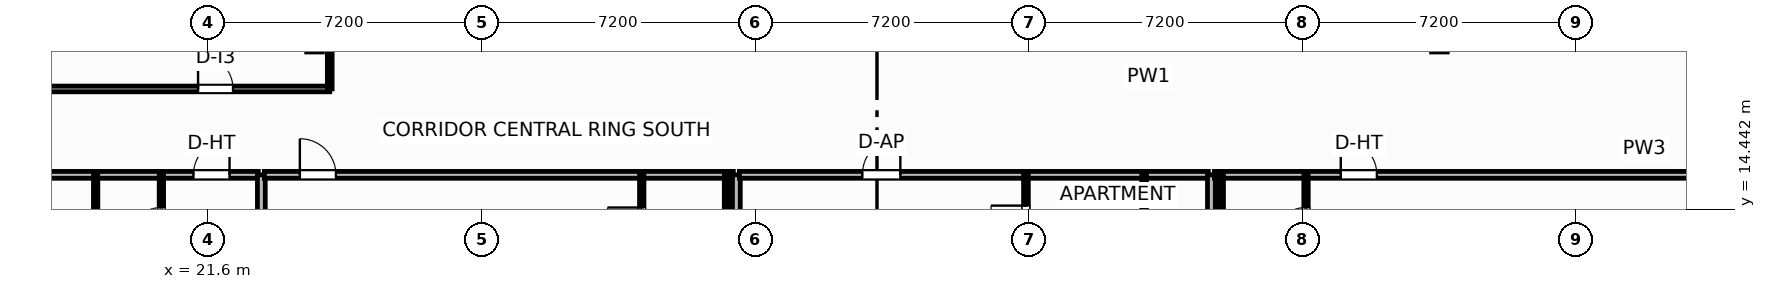
"""IFC4 building model, lengths in metres.
Left out: names, types, materials, properties, quantities, classifications, styles, units other than length and angle.
Written with IfcOpenShell. Run it as: python <this file> out.ifc"""

import sys

from ifc_helpers import new_model, si_unit, direction, frame, frame_2d, origin, place, context, subcontext, project, spatial, rectangle, extrude, element, fill, save


model = new_model("IFC4")
c1 = context("Model", 3, precision=1e-05, world=origin(), true_north=direction((0.0, 1.0)))
c2 = subcontext(c1, "Body", "Model", "MODEL_VIEW")
j1 = project(units=[si_unit("LENGTHUNIT", "METRE"), si_unit("PLANEANGLEUNIT", "RADIAN")], contexts=[c1])
p1 = place(None, origin())
s1 = spatial("IfcSite", under=j1, at=p1, CompositionType="ELEMENT")
p2 = place(p1, origin())
s2 = spatial("IfcBuilding", under=s1, at=p2, CompositionType="ELEMENT")
p3 = place(p2, frame((0.0, 0.0, 227.5)))
s3 = spatial("IfcBuildingStorey", under=s2, at=p3, CompositionType="ELEMENT", Elevation=227.5)
p4 = place(p3, frame((56.219, 9.845, 0.0), z_axis=(0.0, 0.0, 1.0), x_axis=(0.935225601791, 0.354052360188, 0.0)))
e1 = element("IfcWall", 1, at=p4, inside=s3, PredefinedType="SOLIDWALL", context=c2, shape_type="SweptSolid", body=[
    extrude(rectangle(XDim=17.647, YDim=0.22, at=frame_2d((8.824, 0.0))), origin(), (0.0, 0.0, 1.0), 2.73),
])
p5 = place(p4, frame((7.774, 0.0, 0.8)))
e2 = element("IfcOpeningElement", 2, at=p5, cuts=e1, PredefinedType="OPENING", context=c2, shape_type="SweptSolid", body=[
    extrude(rectangle(XDim=2.1, YDim=1.75, at=frame_2d((1.05, 0.875))), frame((0.0, 0.12, 0.0), z_axis=(0.0, -1.0, 0.0), x_axis=(1.0, 0.0, 0.0)), (0.0, 0.0, 1.0), 0.24),
])
p6 = place(p3, frame((6.908, 17.61, 0.0), z_axis=(0.0, 0.0, 1.0), x_axis=(1.0, 0.0, 0.0)))
e3 = element("IfcWall", 3, at=p6, inside=s3, PredefinedType="PARTITIONING", context=c2, shape_type="SweptSolid", body=[
    extrude(rectangle(XDim=17.892, YDim=0.15, at=frame_2d((8.946, 0.0))), origin(), (0.0, 0.0, 1.0), 3.45),
])
p7 = place(p6, frame((14.427, 0.0, 0.0)))
e4 = element("IfcOpeningElement", 4, at=p7, cuts=e3, PredefinedType="OPENING", context=c2, shape_type="SweptSolid", body=[
    extrude(rectangle(XDim=0.92, YDim=2.05, at=frame_2d((0.46, 1.025))), frame((0.0, 0.085, 0.0), z_axis=(0.0, -1.0, 0.0), x_axis=(1.0, 0.0, 0.0)), (0.0, 0.0, 1.0), 0.17),
])
p8 = place(p3, frame((24.8, 17.61, 0.0), z_axis=(0.0, 0.0, 1.0), x_axis=(0.0, 1.0, 0.0)))
e5 = element("IfcWall", 5, at=p8, inside=s3, PredefinedType="PARTITIONING", context=c2, shape_type="SweptSolid", body=[
    extrude(rectangle(XDim=1.63, YDim=0.125, at=frame_2d((0.815, 0.0))), origin(), (0.0, 0.0, 1.0), 2.739),
])
p9 = place(p3, frame((7.764, 15.35, 0.0), z_axis=(0.0, 0.0, 1.0), x_axis=(1.0, 0.0, 0.0)))
e6 = element("IfcWall", 6, at=p9, inside=s3, PredefinedType="PARTITIONING", context=c2, shape_type="SweptSolid", body=[
    extrude(rectangle(XDim=15.156, YDim=0.18, at=frame_2d((7.578, 0.0))), origin(), (0.0, 0.0, 1.0), 3.45),
])
p10 = place(p9, frame((13.45, 0.0, 0.0)))
e7 = element("IfcOpeningElement", 7, at=p10, cuts=e6, PredefinedType="OPENING", context=c2, shape_type="SweptSolid", body=[
    extrude(rectangle(XDim=0.95, YDim=2.15, at=frame_2d((0.475, 1.075))), frame((0.0, 0.1, 0.0), z_axis=(0.0, -1.0, 0.0), x_axis=(1.0, 0.0, 0.0)), (0.0, 0.0, 1.0), 0.2),
])
p11 = place(p3, frame((20.37, 12.83, 0.0), z_axis=(0.0, 0.0, 1.0), x_axis=(0.0, 1.0, 0.0)))
e8 = element("IfcWall", 8, at=p11, inside=s3, PredefinedType="PARTITIONING", context=c2, shape_type="SweptSolid", body=[
    extrude(rectangle(XDim=2.52, YDim=0.115, at=frame_2d((1.26, 0.0))), origin(), (0.0, 0.0, 1.0), 3.45),
])
p12 = place(p11, frame((0.76, 0.0, 0.0)))
e9 = element("IfcOpeningElement", 9, at=p12, cuts=e8, PredefinedType="OPENING", context=c2, shape_type="SweptSolid", body=[
    extrude(rectangle(XDim=0.9, YDim=2.05, at=frame_2d((0.45, 1.025))), frame((0.0, 0.067, 0.0), z_axis=(0.0, -1.0, 0.0), x_axis=(1.0, 0.0, 0.0)), (0.0, 0.0, 1.0), 0.135),
])
p13 = place(p3, frame((18.64, 12.83, 0.0), z_axis=(0.0, 0.0, 1.0), x_axis=(0.0, 1.0, 0.0)))
e10 = element("IfcWall", 10, at=p13, inside=s3, PredefinedType="PARTITIONING", context=c2, shape_type="SweptSolid", body=[
    extrude(rectangle(XDim=2.52, YDim=0.115, at=frame_2d((1.26, 0.0))), origin(), (0.0, 0.0, 1.0), 3.45),
])
p14 = place(p3, frame((23.0, -2.71, 0.0), z_axis=(0.0, 0.0, 1.0), x_axis=(0.0, 1.0, 0.0)))
e11 = element("IfcWall", 11, at=p14, inside=s3, PredefinedType="PARTITIONING", context=c2, shape_type="SweptSolid", body=[
    extrude(rectangle(XDim=18.06, YDim=0.205, at=frame_2d((9.03, 0.0))), origin(), (0.0, 0.0, 1.0), 3.45),
])
p15 = place(p3, frame((23.08, 15.35, 0.0), z_axis=(0.0, 0.0, 1.0), x_axis=(1.0, 0.0, 0.0)))
e12 = element("IfcWall", 12, at=p15, inside=s3, PredefinedType="PARTITIONING", context=c2, shape_type="SweptSolid", body=[
    extrude(rectangle(XDim=12.34, YDim=0.18, at=frame_2d((6.17, 0.0))), origin(), (0.0, 0.0, 1.0), 3.45),
])
p16 = place(p15, frame((0.933, 0.0, 0.0)))
e13 = element("IfcOpeningElement", 13, at=p16, cuts=e12, PredefinedType="OPENING", context=c2, shape_type="SweptSolid", body=[
    extrude(rectangle(XDim=0.95, YDim=2.15, at=frame_2d((0.475, 1.075))), frame((0.0, 0.1, 0.0), z_axis=(0.0, -1.0, 0.0), x_axis=(1.0, 0.0, 0.0)), (0.0, 0.0, 1.0), 0.2),
])
p17 = place(p3, frame((33.01, 12.83, 0.0), z_axis=(0.0, 0.0, 1.0), x_axis=(0.0, 1.0, 0.0)))
e14 = element("IfcWall", 14, at=p17, inside=s3, PredefinedType="PARTITIONING", context=c2, shape_type="SweptSolid", body=[
    extrude(rectangle(XDim=2.52, YDim=0.115, at=frame_2d((1.26, 0.0))), origin(), (0.0, 0.0, 1.0), 3.45),
])
p18 = place(p17, frame((0.76, 0.0, 0.0)))
e15 = element("IfcOpeningElement", 15, at=p18, cuts=e14, PredefinedType="OPENING", context=c2, shape_type="SweptSolid", body=[
    extrude(rectangle(XDim=0.9, YDim=2.05, at=frame_2d((0.45, 1.025))), frame((0.0, 0.067, 0.0), z_axis=(0.0, -1.0, 0.0), x_axis=(1.0, 0.0, 0.0)), (0.0, 0.0, 1.0), 0.135),
])
p19 = place(p3, frame((35.24, 12.83, 0.0), z_axis=(0.0, 0.0, 1.0), x_axis=(0.0, 1.0, 0.0)))
e16 = element("IfcWall", 16, at=p19, inside=s3, PredefinedType="PARTITIONING", context=c2, shape_type="SweptSolid", body=[
    extrude(rectangle(XDim=2.52, YDim=0.115, at=frame_2d((1.26, 0.0))), origin(), (0.0, 0.0, 1.0), 2.739),
])
p20 = place(p3, frame((35.5, 2.022, 0.0), z_axis=(0.0, 0.0, 1.0), x_axis=(0.0, 1.0, 0.0)))
e17 = element("IfcWall", 17, at=p20, inside=s3, PredefinedType="PARTITIONING", context=c2, shape_type="SweptSolid", body=[
    extrude(rectangle(XDim=13.328, YDim=0.205, at=frame_2d((6.664, 0.0))), origin(), (0.0, 0.0, 1.0), 2.739),
])
p21 = place(p3, frame((35.58, 15.35, 0.0), z_axis=(0.0, 0.0, 1.0), x_axis=(1.0, 0.0, 0.0)))
e18 = element("IfcWall", 18, at=p21, inside=s3, PredefinedType="PARTITIONING", context=c2, shape_type="SweptSolid", body=[
    extrude(rectangle(XDim=12.34, YDim=0.18, at=frame_2d((6.17, 0.0))), origin(), (0.0, 0.0, 1.0), 3.45),
])
p22 = place(p21, frame((3.235, 0.0, 0.0)))
e19 = element("IfcOpeningElement", 19, at=p22, cuts=e18, PredefinedType="OPENING", context=c2, shape_type="SweptSolid", body=[
    extrude(rectangle(XDim=1.0, YDim=2.2, at=frame_2d((0.5, 1.1))), frame((0.0, 0.1, 0.0), z_axis=(0.0, -1.0, 0.0), x_axis=(1.0, 0.0, 0.0)), (0.0, 0.0, 1.0), 0.2),
])
p23 = place(p3, frame((43.12, 4.907, 0.0), z_axis=(0.0, 0.0, 1.0), x_axis=(0.0, 1.0, 0.0)))
e20 = element("IfcWall", 20, at=p23, inside=s3, PredefinedType="PARTITIONING", context=c2, shape_type="SweptSolid", body=[
    extrude(rectangle(XDim=10.443, YDim=0.125, at=frame_2d((5.222, 0.0))), origin(), (0.0, 0.0, 1.0), 3.45),
])
p24 = place(p23, frame((2.32, 0.0, 0.0)))
e21 = element("IfcOpeningElement", 21, at=p24, cuts=e20, PredefinedType="OPENING", context=c2, shape_type="SweptSolid", body=[
    extrude(rectangle(XDim=0.92, YDim=2.05, at=frame_2d((0.46, 1.025))), frame((0.0, 0.073, 0.0), z_axis=(0.0, -1.0, 0.0), x_axis=(1.0, 0.0, 0.0)), (0.0, 0.0, 1.0), 0.145),
])
p25 = place(p23, frame((6.42, 0.0, 0.0)))
e22 = element("IfcOpeningElement", 22, at=p25, cuts=e20, PredefinedType="OPENING", context=c2, shape_type="SweptSolid", body=[
    extrude(rectangle(XDim=0.9, YDim=2.05, at=frame_2d((0.45, 1.025))), frame((0.0, 0.073, 0.0), z_axis=(0.0, -1.0, 0.0), x_axis=(1.0, 0.0, 0.0)), (0.0, 0.0, 1.0), 0.145),
])
p26 = place(p23, frame((8.713, 0.0, 0.0)))
e23 = element("IfcOpeningElement", 23, at=p26, cuts=e20, PredefinedType="OPENING", context=c2, shape_type="SweptSolid", body=[
    extrude(rectangle(XDim=0.92, YDim=2.05, at=frame_2d((0.46, 1.025))), frame((0.0, 0.073, 0.0), z_axis=(0.0, -1.0, 0.0), x_axis=(1.0, 0.0, 0.0)), (0.0, 0.0, 1.0), 0.145),
])
p27 = place(p3, frame((46.23, 12.94, 0.0), z_axis=(0.0, 0.0, 1.0), x_axis=(0.0, 1.0, 0.0)))
e24 = element("IfcWall", 24, at=p27, inside=s3, PredefinedType="PARTITIONING", context=c2, shape_type="SweptSolid", body=[
    extrude(rectangle(XDim=2.41, YDim=0.125, at=frame_2d((1.205, 0.0))), origin(), (0.0, 0.0, 1.0), 3.45),
])
p28 = place(p3, frame((48.0, 6.754, 0.0), z_axis=(0.0, 0.0, 1.0), x_axis=(0.0, 1.0, 0.0)))
e25 = element("IfcWall", 25, at=p28, inside=s3, PredefinedType="PARTITIONING", context=c2, shape_type="SweptSolid", body=[
    extrude(rectangle(XDim=8.596, YDim=0.205, at=frame_2d((4.298, 0.0))), origin(), (0.0, 0.0, 1.0), 3.45),
])
p29 = place(p3, frame((48.08, 15.35, 0.0), z_axis=(0.0, 0.0, 1.0), x_axis=(1.0, 0.0, 0.0)))
e26 = element("IfcWall", 26, at=p29, inside=s3, PredefinedType="PARTITIONING", context=c2, shape_type="SweptSolid", body=[
    extrude(rectangle(XDim=22.624, YDim=0.18, at=frame_2d((11.312, 0.0))), origin(), (0.0, 0.0, 1.0), 3.45),
])
p30 = place(p29, frame((3.324, 0.0, 0.0)))
e27 = element("IfcOpeningElement", 27, at=p30, cuts=e26, PredefinedType="OPENING", context=c2, shape_type="SweptSolid", body=[
    extrude(rectangle(XDim=0.95, YDim=2.15, at=frame_2d((0.475, 1.075))), frame((0.0, 0.1, 0.0), z_axis=(0.0, -1.0, 0.0), x_axis=(1.0, 0.0, 0.0)), (0.0, 0.0, 1.0), 0.2),
])
p31 = place(p3, frame((50.49, 12.83, 0.0), z_axis=(0.0, 0.0, 1.0), x_axis=(0.0, 1.0, 0.0)))
e28 = element("IfcWall", 28, at=p31, inside=s3, PredefinedType="PARTITIONING", context=c2, shape_type="SweptSolid", body=[
    extrude(rectangle(XDim=2.52, YDim=0.115, at=frame_2d((1.26, 0.0))), origin(), (0.0, 0.0, 1.0), 3.45),
])
p32 = place(p31, frame((0.76, 0.0, 0.0)))
e29 = element("IfcOpeningElement", 29, at=p32, cuts=e28, PredefinedType="OPENING", context=c2, shape_type="SweptSolid", body=[
    extrude(rectangle(XDim=0.9, YDim=2.05, at=frame_2d((0.45, 1.025))), frame((0.0, 0.067, 0.0), z_axis=(0.0, -1.0, 0.0), x_axis=(1.0, 0.0, 0.0)), (0.0, 0.0, 1.0), 0.135),
])
p33 = place(p3, frame((48.26, 12.83, 0.0), z_axis=(0.0, 0.0, 1.0), x_axis=(0.0, 1.0, 0.0)))
e30 = element("IfcWall", 30, at=p33, inside=s3, PredefinedType="PARTITIONING", context=c2, shape_type="SweptSolid", body=[
    extrude(rectangle(XDim=2.52, YDim=0.115, at=frame_2d((1.26, 0.0))), origin(), (0.0, 0.0, 1.0), 3.45),
])
p34 = place(p7, origin())
e31 = element("IfcDoor", 31, at=p34, inside=s3, OperationType="SINGLE_SWING_LEFT", PredefinedType="DOOR", context=c2, shape_type="SweptSolid", body=[
    extrude(rectangle(XDim=0.92, YDim=2.05, at=frame_2d((0.46, 1.025))), frame((0.0, 0.025, 0.0), z_axis=(0.0, -1.0, 0.0), x_axis=(1.0, 0.0, 0.0)), (0.0, 0.0, 1.0), 0.05),
])
fill(e4, e31)
p35 = place(p10, origin())
e32 = element("IfcDoor", 32, at=p35, inside=s3, OperationType="SINGLE_SWING_RIGHT", PredefinedType="DOOR", context=c2, shape_type="SweptSolid", body=[
    extrude(rectangle(XDim=0.95, YDim=2.15, at=frame_2d((0.475, 1.075))), frame((0.0, 0.025, 0.0), z_axis=(0.0, -1.0, 0.0), x_axis=(1.0, 0.0, 0.0)), (0.0, 0.0, 1.0), 0.05),
])
fill(e7, e32)
p36 = place(p12, origin())
e33 = element("IfcDoor", 33, at=p36, inside=s3, OperationType="SINGLE_SWING_LEFT", PredefinedType="DOOR", context=c2, shape_type="SweptSolid", body=[
    extrude(rectangle(XDim=0.9, YDim=2.05, at=frame_2d((0.45, 1.025))), frame((0.0, 0.025, 0.0), z_axis=(0.0, -1.0, 0.0), x_axis=(1.0, 0.0, 0.0)), (0.0, 0.0, 1.0), 0.05),
])
fill(e9, e33)
p37 = place(p16, origin())
e34 = element("IfcDoor", 34, at=p37, inside=s3, OperationType="SINGLE_SWING_LEFT", PredefinedType="DOOR", context=c2, shape_type="SweptSolid", body=[
    extrude(rectangle(XDim=0.95, YDim=2.15, at=frame_2d((0.475, 1.075))), frame((0.0, 0.025, 0.0), z_axis=(0.0, -1.0, 0.0), x_axis=(1.0, 0.0, 0.0)), (0.0, 0.0, 1.0), 0.05),
])
fill(e13, e34)
p38 = place(p18, origin())
e35 = element("IfcDoor", 35, at=p38, inside=s3, OperationType="SINGLE_SWING_RIGHT", PredefinedType="DOOR", context=c2, shape_type="SweptSolid", body=[
    extrude(rectangle(XDim=0.9, YDim=2.05, at=frame_2d((0.45, 1.025))), frame((0.0, 0.025, 0.0), z_axis=(0.0, -1.0, 0.0), x_axis=(1.0, 0.0, 0.0)), (0.0, 0.0, 1.0), 0.05),
])
fill(e15, e35)
p39 = place(p22, origin())
e36 = element("IfcDoor", 36, at=p39, inside=s3, OperationType="SINGLE_SWING_RIGHT", PredefinedType="DOOR", context=c2, shape_type="SweptSolid", body=[
    extrude(rectangle(XDim=1.0, YDim=2.2, at=frame_2d((0.5, 1.1))), frame((0.0, 0.025, 0.0), z_axis=(0.0, -1.0, 0.0), x_axis=(1.0, 0.0, 0.0)), (0.0, 0.0, 1.0), 0.05),
])
fill(e19, e36)
p40 = place(p26, origin())
e37 = element("IfcDoor", 37, at=p40, inside=s3, OperationType="SINGLE_SWING_RIGHT", PredefinedType="DOOR", context=c2, shape_type="SweptSolid", body=[
    extrude(rectangle(XDim=0.92, YDim=2.05, at=frame_2d((0.46, 1.025))), frame((0.0, 0.025, 0.0), z_axis=(0.0, -1.0, 0.0), x_axis=(1.0, 0.0, 0.0)), (0.0, 0.0, 1.0), 0.05),
])
fill(e23, e37)
p41 = place(p30, origin())
e38 = element("IfcDoor", 38, at=p41, inside=s3, OperationType="SINGLE_SWING_LEFT", PredefinedType="DOOR", context=c2, shape_type="SweptSolid", body=[
    extrude(rectangle(XDim=0.95, YDim=2.15, at=frame_2d((0.475, 1.075))), frame((0.0, 0.025, 0.0), z_axis=(0.0, -1.0, 0.0), x_axis=(1.0, 0.0, 0.0)), (0.0, 0.0, 1.0), 0.05),
])
fill(e27, e38)
p42 = place(p32, origin())
e39 = element("IfcDoor", 39, at=p42, inside=s3, OperationType="SINGLE_SWING_LEFT", PredefinedType="DOOR", context=c2, shape_type="SweptSolid", body=[
    extrude(rectangle(XDim=0.9, YDim=2.05, at=frame_2d((0.45, 1.025))), frame((0.0, 0.025, 0.0), z_axis=(0.0, -1.0, 0.0), x_axis=(1.0, 0.0, 0.0)), (0.0, 0.0, 1.0), 0.05),
])
fill(e29, e39)
save(model, sys.argv[1])
